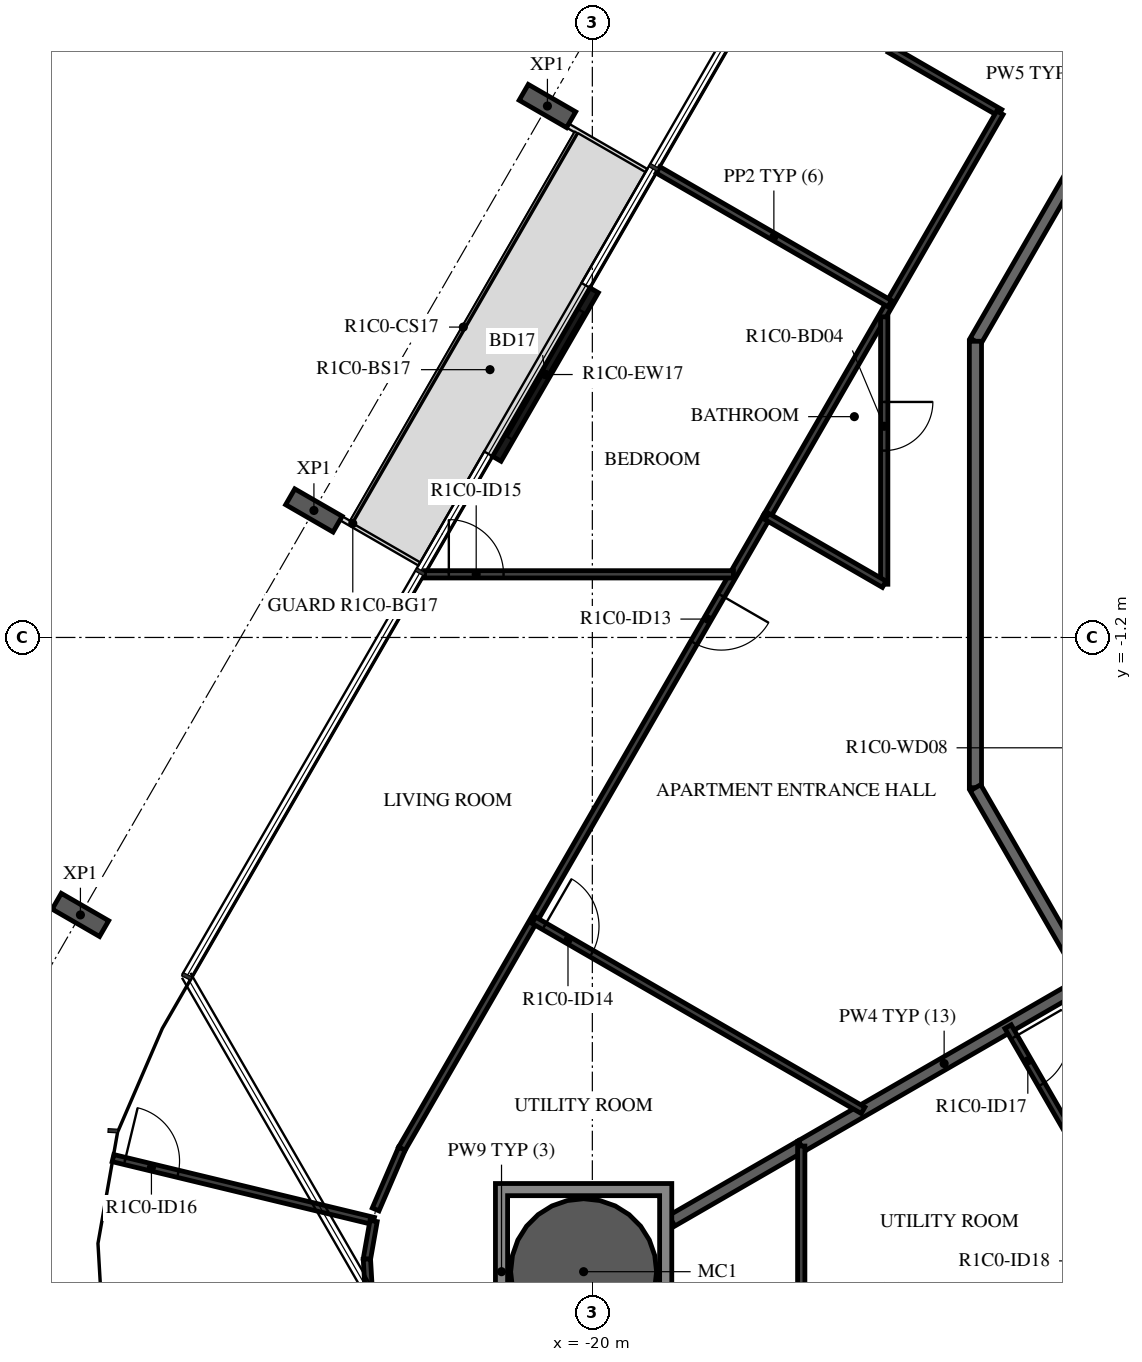
"""IFC4 building model, lengths in metres.
Left out: names, types, materials, properties, quantities, classifications, styles, units other than length and angle.
Written with IfcOpenShell. Run it as: python <this file> out.ifc"""

import sys

from ifc_helpers import new_model, si_unit, direction, frame, frame_2d, origin, origin_2d, place, context, subcontext, project, spatial, polyline, rectangle, hollow_circle, i_section, outline, extrude, element, fill, save


model = new_model("IFC4")
c1 = context("Model", 3, precision=1e-05, world=origin(), true_north=direction((0.0, 1.0)))
c2 = subcontext(c1, "Body", "Model", "MODEL_VIEW")
j1 = project(units=[si_unit("LENGTHUNIT", "METRE"), si_unit("PLANEANGLEUNIT", "RADIAN")], contexts=[c1])
p1 = place(None, origin())
s1 = spatial("IfcSite", under=j1, at=p1, CompositionType="ELEMENT")
p2 = place(p1, origin())
s2 = spatial("IfcBuilding", under=s1, at=p2, CompositionType="ELEMENT")
p3 = place(p2, frame((0.0, 0.0, 59.4)))
s3 = spatial("IfcBuildingStorey", under=s2, at=p3, CompositionType="ELEMENT", Elevation=59.4)
p4 = place(p3, frame((-20.144, -11.63, -0.38), z_axis=(0.0, 0.0, 1.0), x_axis=(1.0, 0.0, 0.0)))
e1 = element("IfcColumn", 1, at=p4, inside=s3, PredefinedType="COLUMN", context=c2, shape_type="SweptSolid", body=[
    extrude(hollow_circle(Radius=1.2, WallThickness=0.06, at=origin_2d()), origin(), (0.0, 0.0, 1.0), 3.5),
])
for number, where, z_axis, x_axis in (
    (2, (-20.739, 7.539, -0.38), (0.0, 0.0, 1.0), (0.5, 0.866, 0.0)),
    (3, (-24.579, 0.888, -0.38), (0.0, 0.0, 1.0), (0.5, 0.866, 0.0)),
    (4, (-28.419, -5.763, -0.38), (0.0, 0.0, 1.0), (0.5, 0.866, 0.0)),
):
    element("IfcColumn", number, at=place(p3, frame(where, z_axis=z_axis, x_axis=x_axis)), inside=s3, PredefinedType="COLUMN", context=c2, shape_type="SweptSolid", body=[
        extrude(i_section(OverallWidth=0.3, OverallDepth=0.9, WebThickness=0.019, FlangeThickness=0.035, FilletRadius=0.03, at=origin_2d()), origin(), (0.0, 0.0, 1.0), 3.5),
    ])
p5 = place(p3, frame((-19.971, 4.51, 0.0), z_axis=(0.0, 0.0, 1.0), x_axis=(-0.500028443584, -0.866008981251, 0.0)))
e5 = element("IfcWall", 5, at=p5, inside=s3, PredefinedType="STANDARD", context=c2, shape_type="SweptSolid", body=[
    extrude(rectangle(XDim=3.2, YDim=0.16, at=frame_2d((1.6, 0.0))), origin(), (0.0, 0.0, 1.0), 3.12),
])
p6 = place(p5, frame((0.4, 0.0, 0.0)))
e6 = element("IfcOpeningElement", 6, at=p6, cuts=e5, PredefinedType="OPENING", context=c2, shape_type="SweptSolid", body=[
    extrude(rectangle(XDim=2.4, YDim=2.4, at=frame_2d((1.2, 1.2))), frame((0.0, 0.09, 0.0), z_axis=(0.0, -1.0, 0.0), x_axis=(1.0, 0.0, 0.0)), (0.0, 0.0, 1.0), 0.18),
])
p7 = place(p3, frame((-10.029, 10.029, 0.0), z_axis=(0.0, 0.0, 1.0), x_axis=(-0.500001669485, -0.866024439905, 0.0)))
e7 = element("IfcWall", 7, at=p7, inside=s3, PredefinedType="STANDARD", context=c2, shape_type="SweptSolid", body=[
    extrude(rectangle(XDim=7.342, YDim=0.2, at=frame_2d((3.671, 0.0))), origin(), (0.0, 0.0, 1.0), 3.12),
])
p8 = place(p7, frame((0.2, 0.0, 0.0)))
e8 = element("IfcOpeningElement", 8, at=p8, cuts=e7, PredefinedType="OPENING", context=c2, shape_type="SweptSolid", body=[
    extrude(rectangle(XDim=1.0, YDim=2.1, at=frame_2d((0.5, 1.05))), frame((0.0, 0.11, 0.0), z_axis=(0.0, -1.0, 0.0), x_axis=(1.0, 0.0, 0.0)), (0.0, 0.0, 1.0), 0.22),
])
for number, where, z_axis, x_axis in (
    (9, (-13.7, 3.671, 0.0), (0.0, 0.0, 1.0), (0.0, -1.0, 0.0)),
    (10, (-13.7, -3.671, 0.0), (0.0, 0.0, 1.0), (0.5, -0.866, 0.0)),
):
    element("IfcWall", number, at=place(p3, frame(where, z_axis=z_axis, x_axis=x_axis)), inside=s3, PredefinedType="STANDARD", context=c2, shape_type="SweptSolid", body=[
        extrude(rectangle(XDim=7.342, YDim=0.2, at=frame_2d((3.671, 0.0))), origin(), (0.0, 0.0, 1.0), 3.12),
    ])
p9 = place(p3, frame((-16.565, -9.564, 0.0), z_axis=(0.0, 0.0, 1.0), x_axis=(0.866028274568, 0.499995027624, 0.0)))
e11 = element("IfcWall", 11, at=p9, inside=s3, PredefinedType="STANDARD", context=c2, shape_type="SweptSolid", body=[
    extrude(rectangle(XDim=5.427, YDim=0.2, at=frame_2d((2.714, 0.0))), origin(), (0.0, 0.0, 1.0), 3.12),
])
p10 = place(p3, frame((-18.694, -10.793, 0.0), z_axis=(0.0, 0.0, 1.0), x_axis=(0.866046662726, 0.499963176624, 0.0)))
e12 = element("IfcWall", 12, at=p10, inside=s3, PredefinedType="STANDARD", context=c2, shape_type="SweptSolid", body=[
    extrude(rectangle(XDim=2.458, YDim=0.2, at=frame_2d((1.229, 0.0))), origin(), (0.0, 0.0, 1.0), 3.12),
])
p11 = place(p3, frame((-15.106, 8.474, 0.0), z_axis=(0.0, 0.0, 1.0), x_axis=(0.866041603473, -0.499971940267, 0.0)))
e13 = element("IfcWall", 13, at=p11, inside=s3, PredefinedType="PARTITIONING", context=c2, shape_type="SweptSolid", body=[
    extrude(rectangle(XDim=2.089, YDim=0.12, at=frame_2d((1.045, 0.0))), origin(), (0.0, 0.0, 1.0), 3.12),
])
p12 = place(p3, frame((-13.297, 7.429, 0.0), z_axis=(0.0, 0.0, 1.0), x_axis=(-0.49999903102, -0.866025963225, 0.0)))
e14 = element("IfcWall", 14, at=p12, inside=s3, PredefinedType="PARTITIONING", context=c2, shape_type="SweptSolid", body=[
    extrude(rectangle(XDim=7.667, YDim=0.12, at=frame_2d((3.833, 0.0))), origin(), (0.0, 0.0, 1.0), 3.12),
])
p13 = place(p3, frame((-17.13, 0.79, 0.0), z_axis=(0.0, 0.0, 1.0), x_axis=(-0.499997052475, -0.866027105532, 0.0)))
e15 = element("IfcWall", 15, at=p13, inside=s3, PredefinedType="PARTITIONING", context=c2, shape_type="SweptSolid", body=[
    extrude(rectangle(XDim=12.006, YDim=0.12, at=frame_2d((6.003, 0.0))), origin(), (0.0, 0.0, 1.0), 3.12),
])
p14 = place(p13, frame((1.498, 0.0, 0.0)))
e16 = element("IfcOpeningElement", 16, at=p14, cuts=e15, PredefinedType="OPENING", context=c2, shape_type="SweptSolid", body=[
    extrude(rectangle(XDim=0.9, YDim=2.1, at=frame_2d((0.45, 1.05))), frame((0.0, 0.07, 0.0), z_axis=(0.0, -1.0, 0.0), x_axis=(1.0, 0.0, 0.0)), (0.0, 0.0, 1.0), 0.14),
])
p15 = place(p3, frame((-15.2, 4.073, 0.0), z_axis=(0.0, 0.0, 1.0), x_axis=(0.0, -1.0, 0.0)))
e17 = element("IfcWall", 17, at=p15, inside=s3, PredefinedType="PARTITIONING", context=c2, shape_type="SweptSolid", body=[
    extrude(rectangle(XDim=4.398, YDim=0.12, at=frame_2d((2.199, 0.0))), origin(), (0.0, 0.0, 1.0), 3.12),
])
p16 = place(p15, frame((1.4, 0.0, 0.0)))
e18 = element("IfcOpeningElement", 18, at=p16, cuts=e17, PredefinedType="OPENING", context=c2, shape_type="SweptSolid", body=[
    extrude(rectangle(XDim=0.8, YDim=2.1, at=frame_2d((0.4, 1.05))), frame((0.0, 0.07, 0.0), z_axis=(0.0, -1.0, 0.0), x_axis=(1.0, 0.0, 0.0)), (0.0, 0.0, 1.0), 0.14),
])
p17 = place(p3, frame((-15.2, -0.325, 0.0), z_axis=(0.0, 0.0, 1.0), x_axis=(-0.866003168561, 0.500038510559, 0.0)))
e19 = element("IfcWall", 19, at=p17, inside=s3, PredefinedType="PARTITIONING", context=c2, shape_type="SweptSolid", body=[
    extrude(rectangle(XDim=2.229, YDim=0.12, at=frame_2d((1.114, 0.0))), origin(), (0.0, 0.0, 1.0), 3.12),
])
p18 = place(p3, frame((-20.963, -5.85, 0.0), z_axis=(0.0, 0.0, 1.0), x_axis=(0.866021746608, -0.500006334362, 0.0)))
e20 = element("IfcWall", 20, at=p18, inside=s3, PredefinedType="PARTITIONING", context=c2, shape_type="SweptSolid", body=[
    extrude(rectangle(XDim=6.253, YDim=0.12, at=frame_2d((3.127, 0.0))), origin(), (0.0, 0.0, 1.0), 3.12),
])
p19 = place(p18, frame((0.2, 0.0, 0.0)))
e21 = element("IfcOpeningElement", 21, at=p19, cuts=e20, PredefinedType="OPENING", context=c2, shape_type="SweptSolid", body=[
    extrude(rectangle(XDim=0.9, YDim=2.1, at=frame_2d((0.45, 1.05))), frame((0.0, 0.07, 0.0), z_axis=(0.0, -1.0, 0.0), x_axis=(1.0, 0.0, 0.0)), (0.0, 0.0, 1.0), 0.14),
])
p20 = place(p3, frame((-18.92, 6.49, 0.0), z_axis=(0.0, 0.0, 1.0), x_axis=(0.865994303029, -0.500053864221, 0.0)))
e22 = element("IfcWall", 22, at=p20, inside=s3, PredefinedType="PARTITIONING", context=c2, shape_type="SweptSolid", body=[
    extrude(rectangle(XDim=4.4, YDim=0.12, at=frame_2d((2.2, 0.0))), origin(), (0.0, 0.0, 1.0), 2.73),
])
p21 = place(p3, frame((-22.76, -0.162, 0.0), z_axis=(0.0, 0.0, 1.0), x_axis=(1.0, 0.0, 0.0)))
e23 = element("IfcWall", 23, at=p21, inside=s3, PredefinedType="PARTITIONING", context=c2, shape_type="SweptSolid", body=[
    extrude(rectangle(XDim=5.081, YDim=0.12, at=frame_2d((2.54, 0.0))), origin(), (0.0, 0.0, 1.0), 3.12),
])
p22 = place(p21, frame((0.4, 0.0, 0.0)))
e24 = element("IfcOpeningElement", 24, at=p22, cuts=e23, PredefinedType="OPENING", context=c2, shape_type="SweptSolid", body=[
    extrude(rectangle(XDim=0.9, YDim=2.1, at=frame_2d((0.45, 1.05))), frame((0.0, 0.07, 0.0), z_axis=(0.0, -1.0, 0.0), x_axis=(1.0, 0.0, 0.0)), (0.0, 0.0, 1.0), 0.14),
])
p23 = place(p3, frame((-23.564, -10.606, 0.0), z_axis=(0.0, 0.0, 1.0), x_axis=(0.396195073027, 0.918166359713, 0.0)))
e25 = element("IfcWall", 25, at=p23, inside=s3, PredefinedType="PARTITIONING", context=c2, shape_type="SweptSolid", body=[
    extrude(rectangle(XDim=1.087, YDim=0.12, at=frame_2d((0.543, 0.0))), origin(), (0.0, 0.0, 1.0), 3.12),
])
p24 = place(p3, frame((-27.883, -9.762, 0.0), z_axis=(0.0, 0.0, 1.0), x_axis=(0.972097015458, -0.234579181809, 0.0)))
e26 = element("IfcWall", 26, at=p24, inside=s3, PredefinedType="PARTITIONING", context=c2, shape_type="SweptSolid", body=[
    extrude(rectangle(XDim=4.409, YDim=0.12, at=frame_2d((2.204, 0.0))), origin(), (0.0, 0.0, 1.0), 3.12),
])
p25 = place(p24, frame((0.2, 0.0, 0.0)))
e27 = element("IfcOpeningElement", 27, at=p25, cuts=e26, PredefinedType="OPENING", context=c2, shape_type="SweptSolid", body=[
    extrude(rectangle(XDim=0.9, YDim=2.1, at=frame_2d((0.45, 1.05))), frame((0.0, 0.07, 0.0), z_axis=(0.0, -1.0, 0.0), x_axis=(1.0, 0.0, 0.0)), (0.0, 0.0, 1.0), 0.14),
])
p26 = place(p3, frame((-23.597, -10.796, 0.0), z_axis=(0.0, 0.0, 1.0), x_axis=(-0.173610040386, -0.984814476882, 0.0)))
e28 = element("IfcWall", 28, at=p26, inside=s3, PredefinedType="PARTITIONING", context=c2, shape_type="SweptSolid", body=[
    extrude(rectangle(XDim=0.636, YDim=0.12, at=frame_2d((0.318, 0.0))), origin(), (0.0, 0.0, 1.0), 3.12),
])
p27 = place(p3, frame((-23.708, -11.422, 0.0), z_axis=(0.0, 0.0, 1.0), x_axis=(0.058031280246, -0.998314765248, 0.0)))
e29 = element("IfcWall", 29, at=p27, inside=s3, PredefinedType="PARTITIONING", context=c2, shape_type="SweptSolid", body=[
    extrude(rectangle(XDim=0.829, YDim=0.12, at=frame_2d((0.415, 0.0))), origin(), (0.0, 0.0, 1.0), 3.12),
])
p28 = place(p3, frame((-13.164, -7.6, 0.0), z_axis=(0.0, 0.0, 1.0), x_axis=(0.500000928893, -0.866024867487, 0.0)))
e30 = element("IfcWall", 30, at=p28, inside=s3, PredefinedType="PARTITIONING", context=c2, shape_type="SweptSolid", body=[
    extrude(rectangle(XDim=4.073, YDim=0.12, at=frame_2d((2.036, 0.0))), origin(), (0.0, 0.0, 1.0), 3.12),
])
p29 = place(p28, frame((0.2, 0.0, 0.0)))
e31 = element("IfcOpeningElement", 31, at=p29, cuts=e30, PredefinedType="OPENING", context=c2, shape_type="SweptSolid", body=[
    extrude(rectangle(XDim=0.9, YDim=2.1, at=frame_2d((0.45, 1.05))), frame((0.0, 0.07, 0.0), z_axis=(0.0, -1.0, 0.0), x_axis=(1.0, 0.0, 0.0)), (0.0, 0.0, 1.0), 0.14),
])
p30 = place(p3, frame((-16.565, -13.63, 0.0), z_axis=(0.0, 0.0, 1.0), x_axis=(0.0, 1.0, 0.0)))
e32 = element("IfcWall", 32, at=p30, inside=s3, PredefinedType="PARTITIONING", context=c2, shape_type="SweptSolid", body=[
    extrude(rectangle(XDim=4.066, YDim=0.12, at=frame_2d((2.033, 0.0))), origin(), (0.0, 0.0, 1.0), 3.12),
])
p31 = place(p30, frame((0.2, 0.0, 0.0)))
e33 = element("IfcOpeningElement", 33, at=p31, cuts=e32, PredefinedType="OPENING", context=c2, shape_type="SweptSolid", body=[
    extrude(rectangle(XDim=0.8, YDim=2.1, at=frame_2d((0.4, 1.05))), frame((0.0, 0.07, 0.0), z_axis=(0.0, -1.0, 0.0), x_axis=(1.0, 0.0, 0.0)), (0.0, 0.0, 1.0), 0.14),
])
p32 = place(p3, origin())
e34 = element("IfcWall", 34, at=p32, inside=s3, PredefinedType="STANDARD", context=c2, shape_type="SweptSolid", body=[
    extrude(outline(polyline([(-18.694, -10.18), (-18.694, -13.08), (-21.594, -13.08), (-21.594, -10.18), (-18.694, -10.18)]), holes=[polyline([(-21.394, -12.88), (-18.894, -12.88), (-18.894, -10.38), (-21.394, -10.38), (-21.394, -12.88)])]), origin(), (0.0, 0.0, 1.0), 3.12),
])
p33 = place(p6, origin())
e35 = element("IfcDoor", 35, at=p33, inside=s3, OperationType="DOUBLE_DOOR_SLIDING", PredefinedType="DOOR", context=c2, shape_type="SweptSolid", body=[
    extrude(rectangle(XDim=2.4, YDim=2.4, at=frame_2d((1.2, 1.2))), frame((0.0, 0.025, 0.0), z_axis=(0.0, -1.0, 0.0), x_axis=(1.0, 0.0, 0.0)), (0.0, 0.0, 1.0), 0.05),
])
fill(e6, e35)
p34 = place(p16, origin())
e36 = element("IfcDoor", 36, at=p34, inside=s3, OperationType="SINGLE_SWING_RIGHT", PredefinedType="DOOR", context=c2, shape_type="SweptSolid", body=[
    extrude(rectangle(XDim=0.8, YDim=2.1, at=frame_2d((0.4, 1.05))), frame((0.0, 0.025, 0.0), z_axis=(0.0, -1.0, 0.0), x_axis=(1.0, 0.0, 0.0)), (0.0, 0.0, 1.0), 0.05),
])
fill(e18, e36)
p35 = place(p14, origin())
e37 = element("IfcDoor", 37, at=p35, inside=s3, OperationType="SINGLE_SWING_RIGHT", PredefinedType="DOOR", context=c2, shape_type="SweptSolid", body=[
    extrude(rectangle(XDim=0.9, YDim=2.1, at=frame_2d((0.45, 1.05))), frame((0.0, 0.025, 0.0), z_axis=(0.0, -1.0, 0.0), x_axis=(1.0, 0.0, 0.0)), (0.0, 0.0, 1.0), 0.05),
])
fill(e16, e37)
p36 = place(p19, origin())
e38 = element("IfcDoor", 38, at=p36, inside=s3, OperationType="SINGLE_SWING_RIGHT", PredefinedType="DOOR", context=c2, shape_type="SweptSolid", body=[
    extrude(rectangle(XDim=0.9, YDim=2.1, at=frame_2d((0.45, 1.05))), frame((0.0, 0.025, 0.0), z_axis=(0.0, -1.0, 0.0), x_axis=(1.0, 0.0, 0.0)), (0.0, 0.0, 1.0), 0.05),
])
fill(e21, e38)
p37 = place(p22, origin())
e39 = element("IfcDoor", 39, at=p37, inside=s3, OperationType="SINGLE_SWING_LEFT", PredefinedType="DOOR", context=c2, shape_type="SweptSolid", body=[
    extrude(rectangle(XDim=0.9, YDim=2.1, at=frame_2d((0.45, 1.05))), frame((0.0, 0.025, 0.0), z_axis=(0.0, -1.0, 0.0), x_axis=(1.0, 0.0, 0.0)), (0.0, 0.0, 1.0), 0.05),
])
fill(e24, e39)
p38 = place(p25, origin())
e40 = element("IfcDoor", 40, at=p38, inside=s3, OperationType="SINGLE_SWING_RIGHT", PredefinedType="DOOR", context=c2, shape_type="SweptSolid", body=[
    extrude(rectangle(XDim=0.9, YDim=2.1, at=frame_2d((0.45, 1.05))), frame((0.0, 0.025, 0.0), z_axis=(0.0, -1.0, 0.0), x_axis=(1.0, 0.0, 0.0)), (0.0, 0.0, 1.0), 0.05),
])
fill(e27, e40)
p39 = place(p29, origin())
e41 = element("IfcDoor", 41, at=p39, inside=s3, OperationType="SINGLE_SWING_LEFT", PredefinedType="DOOR", context=c2, shape_type="SweptSolid", body=[
    extrude(rectangle(XDim=0.9, YDim=2.1, at=frame_2d((0.45, 1.05))), frame((0.0, 0.025, 0.0), z_axis=(0.0, -1.0, 0.0), x_axis=(1.0, 0.0, 0.0)), (0.0, 0.0, 1.0), 0.05),
])
fill(e31, e41)
save(model, sys.argv[1])
